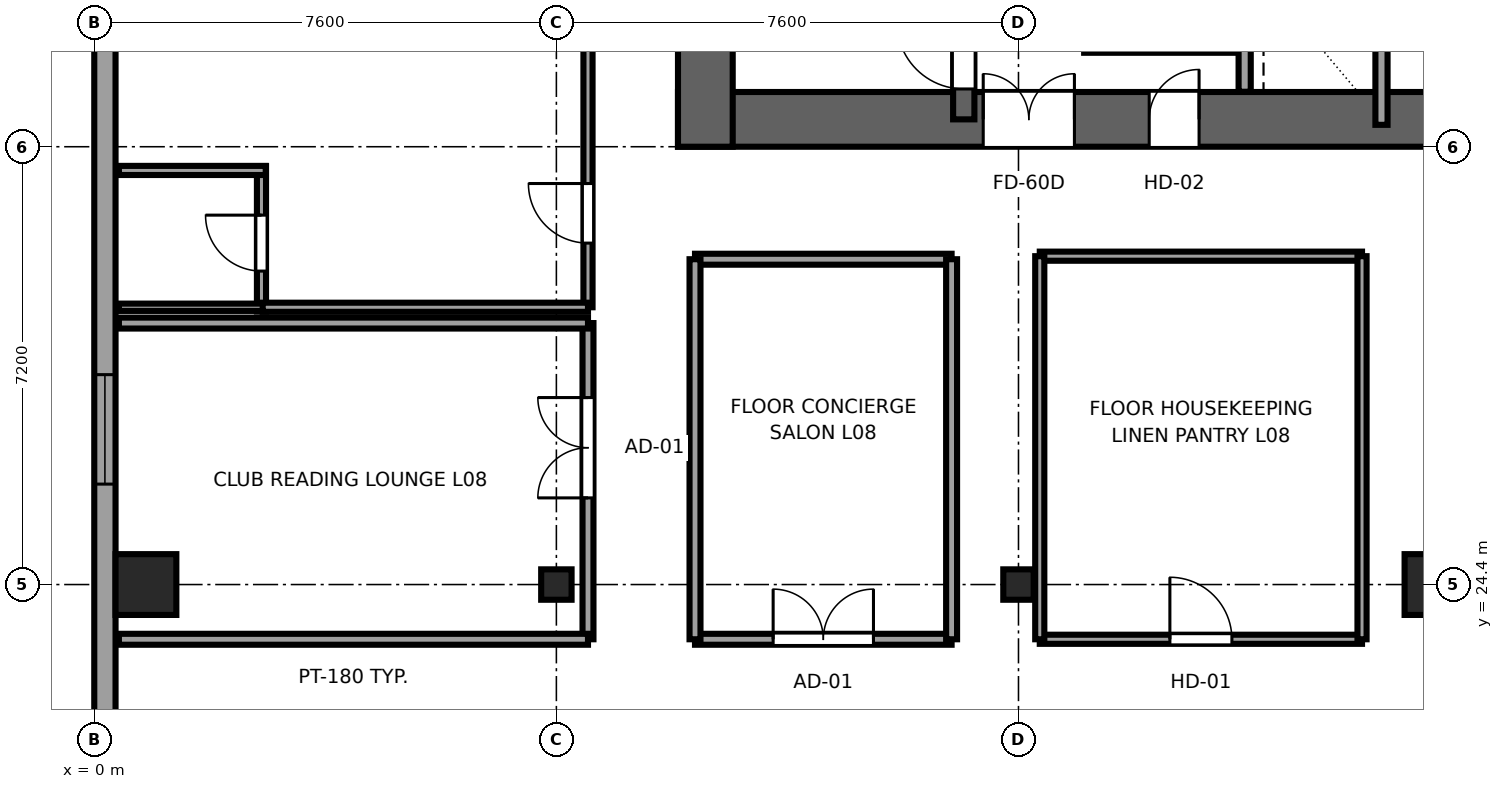
"""IFC4 building model, lengths in metres.
Left out: names, types, materials, properties, quantities, classifications, styles, units other than length and angle.
Written with IfcOpenShell. Run it as: python <this file> out.ifc"""

import sys

from ifc_helpers import new_model, si_unit, direction, frame, frame_2d, origin, origin_2d, place, context, subcontext, project, spatial, rectangle, i_section, extrude, source, transform, mapped, element, fill, save


model = new_model("IFC4")
c1 = context("Model", 3, precision=1e-05, world=origin(), true_north=direction((0.0, 1.0)))
c2 = subcontext(c1, "Body", "Model", "MODEL_VIEW")
j1 = project(units=[si_unit("LENGTHUNIT", "METRE"), si_unit("PLANEANGLEUNIT", "RADIAN")], contexts=[c1])
p1 = place(None, origin())
s1 = spatial("IfcSite", under=j1, at=p1, CompositionType="ELEMENT")
p2 = place(p1, origin())
s2 = spatial("IfcBuilding", under=s1, at=p2, CompositionType="ELEMENT")
p3 = place(p2, frame((0.0, 0.0, 39.1)))
s3 = spatial("IfcBuildingStorey", under=s2, at=p3, CompositionType="ELEMENT", Elevation=39.1)
p4 = place(p3, frame((9.6, 32.05, 0.0), z_axis=(0.0, 0.0, 1.0), x_axis=(1.0, 0.0, 0.0)))
e1 = element("IfcWall", 1, at=p4, inside=s3, PredefinedType="SHEAR", context=c2, shape_type="SweptSolid", body=[
    extrude(rectangle(XDim=26.8, YDim=0.9, at=frame_2d((13.4, 0.0))), origin(), (0.0, 0.0, 1.0), 3.55),
])
p5 = place(p4, frame((6.52, 0.0, 0.0), z_axis=(0.0, 0.0, 1.0), x_axis=(-1.0, 0.0, 0.0)))
e2 = element("IfcOpeningElement", 2, at=p5, cuts=e1, PredefinedType="OPENING", context=c2, shape_type="SweptSolid", body=[
    extrude(rectangle(XDim=1.5, YDim=2.04, at=frame_2d((0.75, 1.02))), frame((0.0, 0.46, 0.0), z_axis=(0.0, -1.0, 0.0), x_axis=(1.0, 0.0, 0.0)), (0.0, 0.0, 1.0), 0.92),
])
p6 = place(p4, frame((14.15, 0.0, 0.0), z_axis=(0.0, 0.0, 1.0), x_axis=(-1.0, 0.0, 0.0)))
e3 = element("IfcOpeningElement", 3, at=p6, cuts=e1, PredefinedType="OPENING", context=c2, shape_type="SweptSolid", body=[
    extrude(rectangle(XDim=1.5, YDim=2.04, at=frame_2d((0.75, 1.02))), frame((0.0, 0.46, 0.0), z_axis=(0.0, -1.0, 0.0), x_axis=(1.0, 0.0, 0.0)), (0.0, 0.0, 1.0), 0.92),
])
p7 = place(p4, frame((21.78, 0.0, 0.0), z_axis=(0.0, 0.0, 1.0), x_axis=(-1.0, 0.0, 0.0)))
e4 = element("IfcOpeningElement", 4, at=p7, cuts=e1, PredefinedType="OPENING", context=c2, shape_type="SweptSolid", body=[
    extrude(rectangle(XDim=1.5, YDim=2.04, at=frame_2d((0.75, 1.02))), frame((0.0, 0.46, 0.0), z_axis=(0.0, -1.0, 0.0), x_axis=(1.0, 0.0, 0.0)), (0.0, 0.0, 1.0), 0.92),
])
p8 = place(p4, frame((8.57, 0.0, 0.0), z_axis=(0.0, 0.0, 1.0), x_axis=(-1.0, 0.0, 0.0)))
e5 = element("IfcOpeningElement", 5, at=p8, cuts=e1, PredefinedType="OPENING", context=c2, shape_type="SweptSolid", body=[
    extrude(rectangle(XDim=0.82, YDim=2.01, at=frame_2d((0.41, 1.005))), frame((0.0, 0.46, 0.0), z_axis=(0.0, -1.0, 0.0), x_axis=(1.0, 0.0, 0.0)), (0.0, 0.0, 1.0), 0.92),
])
p9 = place(p4, frame((19.07, 0.0, 0.0), z_axis=(0.0, 0.0, 1.0), x_axis=(-1.0, 0.0, 0.0)))
e6 = element("IfcOpeningElement", 6, at=p9, cuts=e1, PredefinedType="OPENING", context=c2, shape_type="SweptSolid", body=[
    extrude(rectangle(XDim=0.82, YDim=2.01, at=frame_2d((0.41, 1.005))), frame((0.0, 0.46, 0.0), z_axis=(0.0, -1.0, 0.0), x_axis=(1.0, 0.0, 0.0)), (0.0, 0.0, 1.0), 0.92),
])
p10 = place(p3, frame((10.05, 31.6, 0.0), z_axis=(0.0, 0.0, 1.0), x_axis=(0.0, 1.0, 0.0)))
e7 = element("IfcWall", 7, at=p10, inside=s3, PredefinedType="SHEAR", context=c2, shape_type="SweptSolid", body=[
    extrude(rectangle(XDim=13.6, YDim=0.9, at=frame_2d((6.8, 0.0))), origin(), (0.0, 0.0, 1.0), 3.55),
])
p11 = place(p3, frame((14.3, 32.05, 0.0), z_axis=(0.0, 0.0, 1.0), x_axis=(0.0, 1.0, 0.0)))
e8 = element("IfcWall", 8, at=p11, inside=s3, PredefinedType="SHEAR", context=c2, shape_type="SweptSolid", body=[
    extrude(rectangle(XDim=12.7, YDim=0.35, at=frame_2d((6.35, 0.0))), origin(), (0.0, 0.0, 1.0), 3.55),
])
p12 = place(p11, frame((0.5, 0.0, 0.0)))
e9 = element("IfcOpeningElement", 9, at=p12, cuts=e8, PredefinedType="OPENING", context=c2, shape_type="SweptSolid", body=[
    extrude(rectangle(XDim=1.1, YDim=2.12, at=frame_2d((0.55, 1.06))), frame((0.0, 0.185, 0.0), z_axis=(0.0, -1.0, 0.0), x_axis=(1.0, 0.0, 0.0)), (0.0, 0.0, 1.0), 0.37),
])
m1 = source(origin(), c2, "Body", "SweptSolid", [
    extrude(rectangle(XDim=1.0, YDim=1.0, at=origin_2d()), origin(), (0.0, 0.0, 1.0), 3.55),
])
p13 = place(p3, frame((0.85, 24.4, 0.0), z_axis=(0.0, 0.0, 1.0), x_axis=(1.0, 0.0, 0.0)))
e10 = element("IfcColumn", 10, at=p13, inside=s3, PredefinedType="COLUMN", context=c2, shape_type="MappedRepresentation", body=[
    mapped(m1, transform((0.0, 0.0, 0.0), x_axis=(1.0, 0.0, 0.0), y_axis=(0.0, 1.0, 0.0), z_axis=(0.0, 0.0, 1.0), scale=1.0)),
])
m2 = source(origin(), c2, "Body", "SweptSolid", [
    extrude(i_section(OverallWidth=0.5, OverallDepth=0.5, WebThickness=0.028, FlangeThickness=0.045, at=origin_2d()), origin(), (0.0, 0.0, 1.0), 3.55),
])
for number, where, z_axis, x_axis in (
    (11, (7.6, 24.4, 0.0), (0.0, 0.0, 1.0), (1.0, 0.0, 0.0)),
    (12, (15.2, 24.4, 0.0), (0.0, 0.0, 1.0), (1.0, 0.0, 0.0)),
):
    element("IfcColumn", number, at=place(p3, frame(where, z_axis=z_axis, x_axis=x_axis)), inside=s3, PredefinedType="COLUMN", context=c2, shape_type="MappedRepresentation", body=[
        mapped(m2, transform((0.0, 0.0, 0.0), x_axis=(1.0, 0.0, 0.0), y_axis=(0.0, 1.0, 0.0), z_axis=(0.0, 0.0, 1.0), scale=1.0)),
    ])
p14 = place(p3, frame((22.05, 24.4, 0.0), z_axis=(0.0, 0.0, 1.0), x_axis=(1.0, 0.0, 0.0)))
e13 = element("IfcColumn", 13, at=p14, inside=s3, PredefinedType="COLUMN", context=c2, shape_type="MappedRepresentation", body=[
    mapped(m1, transform((0.0, 0.0, 0.0), x_axis=(1.0, 0.0, 0.0), y_axis=(0.0, 1.0, 0.0), z_axis=(0.0, 0.0, 1.0), scale=1.0)),
])
p15 = place(p3, frame((0.175, 41.383, 0.0), z_axis=(0.0, 0.0, 1.0), x_axis=(0.0, -1.0, 0.0)))
e14 = element("IfcWall", 14, at=p15, inside=s3, PredefinedType="SOLIDWALL", context=c2, shape_type="SweptSolid", body=[
    extrude(rectangle(XDim=36.766, YDim=0.35, at=frame_2d((18.383, 0.0))), origin(), (0.0, 0.0, 1.0), 3.37),
])
p16 = place(p15, frame((1.676, 0.0, 0.68)))
e15 = element("IfcOpeningElement", 15, at=p16, cuts=e14, PredefinedType="OPENING", context=c2, shape_type="SweptSolid", body=[
    extrude(rectangle(XDim=1.8, YDim=1.85, at=frame_2d((0.9, 0.925))), frame((0.0, 0.185, 0.0), z_axis=(0.0, -1.0, 0.0), x_axis=(1.0, 0.0, 0.0)), (0.0, 0.0, 1.0), 0.37),
])
p17 = place(p15, frame((4.578, 0.0, 0.68)))
e16 = element("IfcOpeningElement", 16, at=p17, cuts=e14, PredefinedType="OPENING", context=c2, shape_type="SweptSolid", body=[
    extrude(rectangle(XDim=1.8, YDim=1.85, at=frame_2d((0.9, 0.925))), frame((0.0, 0.185, 0.0), z_axis=(0.0, -1.0, 0.0), x_axis=(1.0, 0.0, 0.0)), (0.0, 0.0, 1.0), 0.37),
])
p18 = place(p15, frame((13.531, 0.0, 0.68)))
e17 = element("IfcOpeningElement", 17, at=p18, cuts=e14, PredefinedType="OPENING", context=c2, shape_type="SweptSolid", body=[
    extrude(rectangle(XDim=1.8, YDim=1.85, at=frame_2d((0.9, 0.925))), frame((0.0, 0.185, 0.0), z_axis=(0.0, -1.0, 0.0), x_axis=(1.0, 0.0, 0.0)), (0.0, 0.0, 1.0), 0.37),
])
p19 = place(p15, frame((21.435, 0.0, 0.68)))
e18 = element("IfcOpeningElement", 18, at=p19, cuts=e14, PredefinedType="OPENING", context=c2, shape_type="SweptSolid", body=[
    extrude(rectangle(XDim=1.8, YDim=1.85, at=frame_2d((0.9, 0.925))), frame((0.0, 0.185, 0.0), z_axis=(0.0, -1.0, 0.0), x_axis=(1.0, 0.0, 0.0)), (0.0, 0.0, 1.0), 0.37),
])
p20 = place(p15, frame((26.436, 0.0, 0.68)))
e19 = element("IfcOpeningElement", 19, at=p20, cuts=e14, PredefinedType="OPENING", context=c2, shape_type="SweptSolid", body=[
    extrude(rectangle(XDim=1.8, YDim=1.85, at=frame_2d((0.9, 0.925))), frame((0.0, 0.185, 0.0), z_axis=(0.0, -1.0, 0.0), x_axis=(1.0, 0.0, 0.0)), (0.0, 0.0, 1.0), 0.37),
])
p21 = place(p15, frame((29.338, 0.0, 0.68)))
e20 = element("IfcOpeningElement", 20, at=p21, cuts=e14, PredefinedType="OPENING", context=c2, shape_type="SweptSolid", body=[
    extrude(rectangle(XDim=1.8, YDim=1.85, at=frame_2d((0.9, 0.925))), frame((0.0, 0.185, 0.0), z_axis=(0.0, -1.0, 0.0), x_axis=(1.0, 0.0, 0.0)), (0.0, 0.0, 1.0), 0.37),
])
p22 = place(p15, frame((34.34, 0.0, 0.68)))
e21 = element("IfcOpeningElement", 21, at=p22, cuts=e14, PredefinedType="OPENING", context=c2, shape_type="SweptSolid", body=[
    extrude(rectangle(XDim=1.8, YDim=1.85, at=frame_2d((0.9, 0.925))), frame((0.0, 0.185, 0.0), z_axis=(0.0, -1.0, 0.0), x_axis=(1.0, 0.0, 0.0)), (0.0, 0.0, 1.0), 0.37),
])
p23 = place(p3, frame((18.92, 32.504, 0.0), z_axis=(0.0, 0.0, 1.0), x_axis=(0.0, 1.0, 0.0)))
e22 = element("IfcWall", 22, at=p23, inside=s3, PredefinedType="SOLIDWALL", context=c2, shape_type="SweptSolid", body=[
    extrude(rectangle(XDim=3.646, YDim=0.2, at=frame_2d((1.823, 0.0))), origin(), (0.0, 0.0, 1.0), 3.37),
])
p24 = place(p3, frame((21.17, 31.96, 0.0), z_axis=(0.0, 0.0, 1.0), x_axis=(0.0, 1.0, 0.0)))
e23 = element("IfcWall", 23, at=p24, inside=s3, PredefinedType="SOLIDWALL", context=c2, shape_type="SweptSolid", body=[
    extrude(rectangle(XDim=12.58, YDim=0.2, at=frame_2d((6.29, 0.0))), origin(), (0.0, 0.0, 1.0), 3.37),
])
p25 = place(p3, frame((2.75, 28.89, 0.0), z_axis=(0.0, 0.0, 1.0), x_axis=(0.0, 1.0, 0.0)))
e24 = element("IfcWall", 24, at=p25, inside=s3, PredefinedType="PARTITIONING", context=c2, shape_type="SweptSolid", body=[
    extrude(rectangle(XDim=2.39, YDim=0.15, at=frame_2d((1.195, 0.0))), origin(), (0.0, 0.0, 1.0), 3.37),
])
p26 = place(p25, frame((0.665, 0.0, 0.0)))
e25 = element("IfcOpeningElement", 25, at=p26, cuts=e24, PredefinedType="OPENING", context=c2, shape_type="SweptSolid", body=[
    extrude(rectangle(XDim=0.92, YDim=2.01, at=frame_2d((0.46, 1.005))), frame((0.0, 0.085, 0.0), z_axis=(0.0, -1.0, 0.0), x_axis=(1.0, 0.0, 0.0)), (0.0, 0.0, 1.0), 0.17),
])
p27 = place(p3, frame((0.405, 28.96, 0.0), z_axis=(0.0, 0.0, 1.0), x_axis=(1.0, 0.0, 0.0)))
e26 = element("IfcWall", 26, at=p27, inside=s3, PredefinedType="PLUMBINGWALL", context=c2, shape_type="SweptSolid", body=[
    extrude(rectangle(XDim=2.415, YDim=0.12, at=frame_2d((1.208, 0.0))), origin(), (0.0, 0.0, 1.0), 3.37),
])
p28 = place(p3, frame((0.405, 31.21, 0.0), z_axis=(0.0, 0.0, 1.0), x_axis=(1.0, 0.0, 0.0)))
e27 = element("IfcWall", 27, at=p28, inside=s3, PredefinedType="PARTITIONING", context=c2, shape_type="SweptSolid", body=[
    extrude(rectangle(XDim=2.415, YDim=0.15, at=frame_2d((1.208, 0.0))), origin(), (0.0, 0.0, 1.0), 3.37),
])
p29 = place(p3, frame((16.28, 33.22, 0.0), z_axis=(0.0, 0.0, 1.0), x_axis=(1.0, 0.0, 0.0)))
e28 = element("IfcWall", 28, at=p29, inside=s3, PredefinedType="PARTITIONING", context=c2, shape_type="SweptSolid", body=[
    extrude(rectangle(XDim=2.485, YDim=0.15, at=frame_2d((1.242, 0.0))), origin(), (0.0, 0.0, 1.0), 3.37),
])
p30 = place(p3, frame((8.12, 23.5, 0.0), z_axis=(0.0, 0.0, 1.0), x_axis=(0.0, 1.0, 0.0)))
e29 = element("IfcWall", 29, at=p30, inside=s3, PredefinedType="PARTITIONING", context=c2, shape_type="SweptSolid", body=[
    extrude(rectangle(XDim=5.2, YDim=0.18, at=frame_2d((2.6, 0.0))), origin(), (0.0, 0.0, 1.0), 3.37),
])
p31 = place(p30, frame((2.325, 0.0, 0.0)))
e30 = element("IfcOpeningElement", 30, at=p31, cuts=e29, PredefinedType="OPENING", context=c2, shape_type="SweptSolid", body=[
    extrude(rectangle(XDim=1.65, YDim=2.15, at=frame_2d((0.825, 1.075))), frame((0.0, 0.1, 0.0), z_axis=(0.0, -1.0, 0.0), x_axis=(1.0, 0.0, 0.0)), (0.0, 0.0, 1.0), 0.2),
])
for number, where, z_axis, x_axis in (
    (31, (0.405, 23.5, 0.0), (0.0, 0.0, 1.0), (1.0, 0.0, 0.0)),
    (32, (0.405, 28.7, 0.0), (0.0, 0.0, 1.0), (1.0, 0.0, 0.0)),
):
    element("IfcWall", number, at=place(p3, frame(where, z_axis=z_axis, x_axis=x_axis)), inside=s3, PredefinedType="PARTITIONING", context=c2, shape_type="SweptSolid", body=[
        extrude(rectangle(XDim=7.715, YDim=0.18, at=frame_2d((3.857, 0.0))), origin(), (0.0, 0.0, 1.0), 3.37),
    ])
p32 = place(p3, frame((8.12, 28.96, 0.0), z_axis=(0.0, 0.0, 1.0), x_axis=(0.0, 1.0, 0.0)))
e33 = element("IfcWall", 33, at=p32, inside=s3, PredefinedType="PARTITIONING", context=c2, shape_type="SweptSolid", body=[
    extrude(rectangle(XDim=16.635, YDim=0.15, at=frame_2d((8.317, 0.0))), origin(), (0.0, 0.0, 1.0), 3.37),
])
p33 = place(p32, frame((1.055, 0.0, 0.0)))
e34 = element("IfcOpeningElement", 34, at=p33, cuts=e33, PredefinedType="OPENING", context=c2, shape_type="SweptSolid", body=[
    extrude(rectangle(XDim=0.98, YDim=2.12, at=frame_2d((0.49, 1.06))), frame((0.0, 0.085, 0.0), z_axis=(0.0, -1.0, 0.0), x_axis=(1.0, 0.0, 0.0)), (0.0, 0.0, 1.0), 0.17),
])
p34 = place(p3, frame((2.77, 28.96, 0.0), z_axis=(0.0, 0.0, 1.0), x_axis=(1.0, 0.0, 0.0)))
e35 = element("IfcWall", 35, at=p34, inside=s3, PredefinedType="PARTITIONING", context=c2, shape_type="SweptSolid", body=[
    extrude(rectangle(XDim=5.35, YDim=0.15, at=frame_2d((2.675, 0.0))), origin(), (0.0, 0.0, 1.0), 3.37),
])
p35 = place(p3, frame((9.88, 23.5, 0.0), z_axis=(0.0, 0.0, 1.0), x_axis=(1.0, 0.0, 0.0)))
e36 = element("IfcWall", 36, at=p35, inside=s3, PredefinedType="PARTITIONING", context=c2, shape_type="SweptSolid", body=[
    extrude(rectangle(XDim=4.22, YDim=0.18, at=frame_2d((2.11, 0.0))), origin(), (0.0, 0.0, 1.0), 3.37),
])
p36 = place(p35, frame((1.285, 0.0, 0.0)))
e37 = element("IfcOpeningElement", 37, at=p36, cuts=e36, PredefinedType="OPENING", context=c2, shape_type="SweptSolid", body=[
    extrude(rectangle(XDim=1.65, YDim=2.15, at=frame_2d((0.825, 1.075))), frame((0.0, 0.1, 0.0), z_axis=(0.0, -1.0, 0.0), x_axis=(1.0, 0.0, 0.0)), (0.0, 0.0, 1.0), 0.2),
])
p37 = place(p3, frame((9.88, 29.75, 0.0), z_axis=(0.0, 0.0, 1.0), x_axis=(1.0, 0.0, 0.0)))
e38 = element("IfcWall", 38, at=p37, inside=s3, PredefinedType="PARTITIONING", context=c2, shape_type="SweptSolid", body=[
    extrude(rectangle(XDim=4.22, YDim=0.18, at=frame_2d((2.11, 0.0))), origin(), (0.0, 0.0, 1.0), 3.37),
])
for number, where, z_axis, x_axis in (
    (39, (9.88, 23.5, 0.0), (0.0, 0.0, 1.0), (0.0, 1.0, 0.0)),
    (40, (14.1, 23.5, 0.0), (0.0, 0.0, 1.0), (0.0, 1.0, 0.0)),
):
    element("IfcWall", number, at=place(p3, frame(where, z_axis=z_axis, x_axis=x_axis)), inside=s3, PredefinedType="PARTITIONING", context=c2, shape_type="SweptSolid", body=[
        extrude(rectangle(XDim=6.25, YDim=0.18, at=frame_2d((3.125, 0.0))), origin(), (0.0, 0.0, 1.0), 3.37),
    ])
p38 = place(p3, frame((15.55, 23.5, 0.0), z_axis=(0.0, 0.0, 1.0), x_axis=(1.0, 0.0, 0.0)))
e41 = element("IfcWall", 41, at=p38, inside=s3, PredefinedType="PARTITIONING", context=c2, shape_type="SweptSolid", body=[
    extrude(rectangle(XDim=5.3, YDim=0.15, at=frame_2d((2.65, 0.0))), origin(), (0.0, 0.0, 1.0), 3.37),
])
p39 = place(p38, frame((2.14, 0.0, 0.0)))
e42 = element("IfcOpeningElement", 42, at=p39, cuts=e41, PredefinedType="OPENING", context=c2, shape_type="SweptSolid", body=[
    extrude(rectangle(XDim=1.02, YDim=2.03, at=frame_2d((0.51, 1.015))), frame((0.0, 0.085, 0.0), z_axis=(0.0, -1.0, 0.0), x_axis=(1.0, 0.0, 0.0)), (0.0, 0.0, 1.0), 0.17),
])
p40 = place(p3, frame((15.55, 29.8, 0.0), z_axis=(0.0, 0.0, 1.0), x_axis=(1.0, 0.0, 0.0)))
e43 = element("IfcWall", 43, at=p40, inside=s3, PredefinedType="PARTITIONING", context=c2, shape_type="SweptSolid", body=[
    extrude(rectangle(XDim=5.3, YDim=0.15, at=frame_2d((2.65, 0.0))), origin(), (0.0, 0.0, 1.0), 3.37),
])
for number, where, z_axis, x_axis in (
    (44, (15.55, 23.5, 0.0), (0.0, 0.0, 1.0), (0.0, 1.0, 0.0)),
    (45, (20.85, 23.5, 0.0), (0.0, 0.0, 1.0), (0.0, 1.0, 0.0)),
):
    element("IfcWall", number, at=place(p3, frame(where, z_axis=z_axis, x_axis=x_axis)), inside=s3, PredefinedType="PARTITIONING", context=c2, shape_type="SweptSolid", body=[
        extrude(rectangle(XDim=6.3, YDim=0.15, at=frame_2d((3.15, 0.0))), origin(), (0.0, 0.0, 1.0), 3.37),
    ])
m3 = source(origin(), c2, "Body", "SweptSolid", [
    extrude(rectangle(XDim=1.8, YDim=1.85, at=frame_2d((0.9, 0.925))), frame((0.0, 0.09, 0.0), z_axis=(0.0, -1.0, 0.0), x_axis=(1.0, 0.0, 0.0)), (0.0, 0.0, 1.0), 0.06),
])
p41 = place(p18, origin())
e46 = element("IfcWindow", 46, at=p41, inside=s3, PartitioningType="TRIPLE_PANEL_HORIZONTAL", PredefinedType="WINDOW", context=c2, shape_type="MappedRepresentation", body=[
    mapped(m3, transform((0.0, 0.0, 0.0), x_axis=(1.0, 0.0, 0.0), y_axis=(0.0, 1.0, 0.0), z_axis=(0.0, 0.0, 1.0), scale=1.0)),
])
fill(e17, e46)
m4 = source(origin(), c2, "Body", "SweptSolid", [
    extrude(rectangle(XDim=1.1, YDim=2.12, at=frame_2d((0.55, 1.06))), frame((0.0, 0.025, 0.0), z_axis=(0.0, -1.0, 0.0), x_axis=(1.0, 0.0, 0.0)), (0.0, 0.0, 1.0), 0.05),
])
p42 = place(p12, origin())
e47 = element("IfcDoor", 47, at=p42, inside=s3, OperationType="SINGLE_SWING_RIGHT", PredefinedType="DOOR", context=c2, shape_type="MappedRepresentation", body=[
    mapped(m4, transform((0.0, 0.0, 0.0), x_axis=(1.0, 0.0, 0.0), y_axis=(0.0, 1.0, 0.0), z_axis=(0.0, 0.0, 1.0), scale=1.0)),
])
fill(e9, e47)
m5 = source(origin(), c2, "Body", "SweptSolid", [
    extrude(rectangle(XDim=1.5, YDim=2.04, at=frame_2d((0.75, 1.02))), frame((0.0, 0.025, 0.0), z_axis=(0.0, -1.0, 0.0), x_axis=(1.0, 0.0, 0.0)), (0.0, 0.0, 1.0), 0.05),
])
p43 = place(p5, origin())
e48 = element("IfcDoor", 48, at=p43, inside=s3, OperationType="DOUBLE_DOOR_SINGLE_SWING", PredefinedType="DOOR", context=c2, shape_type="MappedRepresentation", body=[
    mapped(m5, transform((0.0, 0.0, 0.0), x_axis=(1.0, 0.0, 0.0), y_axis=(0.0, 1.0, 0.0), z_axis=(0.0, 0.0, 1.0), scale=1.0)),
])
fill(e2, e48)
m6 = source(origin(), c2, "Body", "SweptSolid", [
    extrude(rectangle(XDim=0.82, YDim=2.01, at=frame_2d((0.41, 1.005))), frame((0.0, 0.025, 0.0), z_axis=(0.0, -1.0, 0.0), x_axis=(1.0, 0.0, 0.0)), (0.0, 0.0, 1.0), 0.05),
])
p44 = place(p8, origin())
e49 = element("IfcDoor", 49, at=p44, inside=s3, OperationType="SINGLE_SWING_RIGHT", PredefinedType="DOOR", context=c2, shape_type="MappedRepresentation", body=[
    mapped(m6, transform((0.0, 0.0, 0.0), x_axis=(1.0, 0.0, 0.0), y_axis=(0.0, 1.0, 0.0), z_axis=(0.0, 0.0, 1.0), scale=1.0)),
])
fill(e5, e49)
m7 = source(origin(), c2, "Body", "SweptSolid", [
    extrude(rectangle(XDim=0.92, YDim=2.01, at=frame_2d((0.46, 1.005))), frame((0.0, 0.025, 0.0), z_axis=(0.0, -1.0, 0.0), x_axis=(1.0, 0.0, 0.0)), (0.0, 0.0, 1.0), 0.05),
])
p45 = place(p26, origin())
e50 = element("IfcDoor", 50, at=p45, inside=s3, OperationType="SINGLE_SWING_RIGHT", PredefinedType="DOOR", context=c2, shape_type="MappedRepresentation", body=[
    mapped(m7, transform((0.0, 0.0, 0.0), x_axis=(1.0, 0.0, 0.0), y_axis=(0.0, 1.0, 0.0), z_axis=(0.0, 0.0, 1.0), scale=1.0)),
])
fill(e25, e50)
m8 = source(origin(), c2, "Body", "SweptSolid", [
    extrude(rectangle(XDim=1.65, YDim=2.15, at=frame_2d((0.825, 1.075))), frame((0.0, 0.025, 0.0), z_axis=(0.0, -1.0, 0.0), x_axis=(1.0, 0.0, 0.0)), (0.0, 0.0, 1.0), 0.05),
])
p46 = place(p31, origin())
e51 = element("IfcDoor", 51, at=p46, inside=s3, OperationType="DOUBLE_DOOR_SINGLE_SWING", PredefinedType="DOOR", context=c2, shape_type="MappedRepresentation", body=[
    mapped(m8, transform((0.0, 0.0, 0.0), x_axis=(1.0, 0.0, 0.0), y_axis=(0.0, 1.0, 0.0), z_axis=(0.0, 0.0, 1.0), scale=1.0)),
])
fill(e30, e51)
m9 = source(origin(), c2, "Body", "SweptSolid", [
    extrude(rectangle(XDim=0.98, YDim=2.12, at=frame_2d((0.49, 1.06))), frame((0.0, 0.025, 0.0), z_axis=(0.0, -1.0, 0.0), x_axis=(1.0, 0.0, 0.0)), (0.0, 0.0, 1.0), 0.05),
])
p47 = place(p33, origin())
e52 = element("IfcDoor", 52, at=p47, inside=s3, OperationType="SINGLE_SWING_RIGHT", PredefinedType="DOOR", context=c2, shape_type="MappedRepresentation", body=[
    mapped(m9, transform((0.0, 0.0, 0.0), x_axis=(1.0, 0.0, 0.0), y_axis=(0.0, 1.0, 0.0), z_axis=(0.0, 0.0, 1.0), scale=1.0)),
])
fill(e34, e52)
p48 = place(p36, origin())
e53 = element("IfcDoor", 53, at=p48, inside=s3, OperationType="DOUBLE_DOOR_SINGLE_SWING", PredefinedType="DOOR", context=c2, shape_type="MappedRepresentation", body=[
    mapped(m8, transform((0.0, 0.0, 0.0), x_axis=(1.0, 0.0, 0.0), y_axis=(0.0, 1.0, 0.0), z_axis=(0.0, 0.0, 1.0), scale=1.0)),
])
fill(e37, e53)
m10 = source(origin(), c2, "Body", "SweptSolid", [
    extrude(rectangle(XDim=1.02, YDim=2.03, at=frame_2d((0.51, 1.015))), frame((0.0, 0.025, 0.0), z_axis=(0.0, -1.0, 0.0), x_axis=(1.0, 0.0, 0.0)), (0.0, 0.0, 1.0), 0.05),
])
p49 = place(p39, origin())
e54 = element("IfcDoor", 54, at=p49, inside=s3, OperationType="SINGLE_SWING_LEFT", PredefinedType="DOOR", context=c2, shape_type="MappedRepresentation", body=[
    mapped(m10, transform((0.0, 0.0, 0.0), x_axis=(1.0, 0.0, 0.0), y_axis=(0.0, 1.0, 0.0), z_axis=(0.0, 0.0, 1.0), scale=1.0)),
])
fill(e42, e54)
save(model, sys.argv[1])
